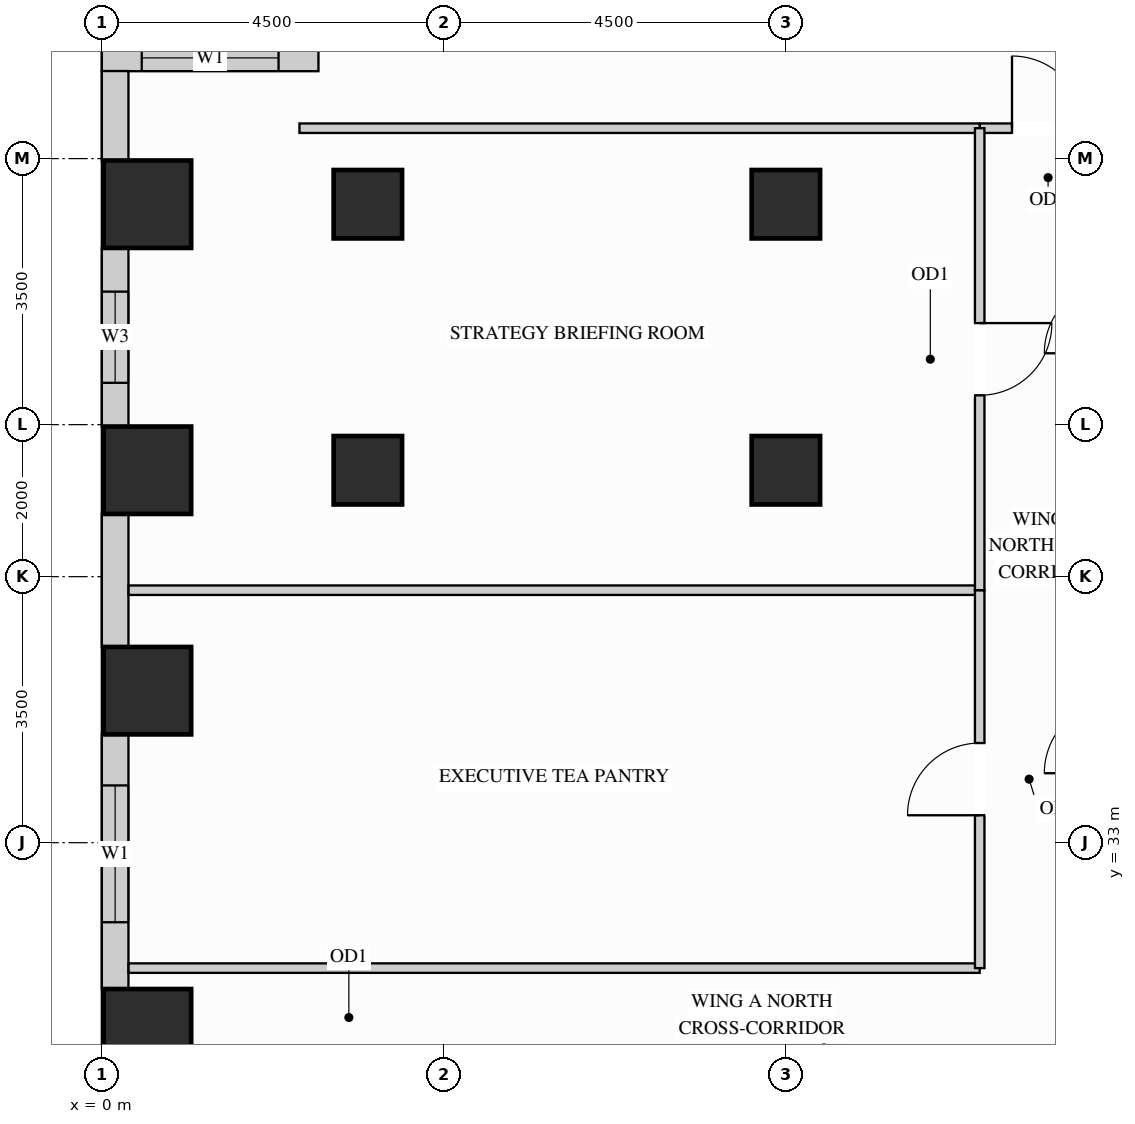
"""IFC4 building model, lengths in metres.
Left out: names, types, materials, properties, quantities, classifications, styles, units other than length and angle.
Written with IfcOpenShell. Run it as: python <this file> out.ifc"""

import sys

from ifc_helpers import new_model, si_unit, direction, frame, frame_2d, origin, origin_2d, place, context, subcontext, project, spatial, rectangle, extrude, source, transform, mapped, element, fill, save


model = new_model("IFC4")
c1 = context("Model", 3, precision=1e-05, world=origin(), true_north=direction((0.0, 1.0)))
c2 = subcontext(c1, "Body", "Model", "MODEL_VIEW")
j1 = project(units=[si_unit("LENGTHUNIT", "METRE"), si_unit("PLANEANGLEUNIT", "RADIAN")], contexts=[c1])
p1 = place(None, origin())
s1 = spatial("IfcSite", under=j1, at=p1, CompositionType="ELEMENT")
p2 = place(p1, origin())
s2 = spatial("IfcBuilding", under=s1, at=p2, CompositionType="ELEMENT")
p3 = place(p2, frame((0.0, 0.0, 113.4)))
s3 = spatial("IfcBuildingStorey", under=s2, at=p3, CompositionType="ELEMENT", Elevation=113.4)
m1 = source(origin(), c2, "Body", "SweptSolid", [
    extrude(rectangle(XDim=0.9, YDim=0.9, at=origin_2d()), origin(), (0.0, 0.0, 1.0), 3.38),
])
for number, where, z_axis, x_axis in (
    (1, (3.5, 37.9, 0.0), (0.0, 0.0, 1.0), (1.0, 0.0, 0.0)),
    (2, (3.5, 41.4, 0.0), (0.0, 0.0, 1.0), (1.0, 0.0, 0.0)),
    (3, (9.0, 37.9, 0.0), (0.0, 0.0, 1.0), (1.0, 0.0, 0.0)),
    (4, (9.0, 41.4, 0.0), (0.0, 0.0, 1.0), (1.0, 0.0, 0.0)),
):
    element("IfcColumn", number, at=place(p3, frame(where, z_axis=z_axis, x_axis=x_axis)), inside=s3, PredefinedType="COLUMN", context=c2, shape_type="MappedRepresentation", body=[
        mapped(m1, transform((0.0, 0.0, 0.0), x_axis=(1.0, 0.0, 0.0), y_axis=(0.0, 1.0, 0.0), z_axis=(0.0, 0.0, 1.0))),
    ])
m2 = source(origin(), c2, "Body", "SweptSolid", [
    extrude(rectangle(XDim=1.15, YDim=1.15, at=origin_2d()), origin(), (0.0, 0.0, 1.0), 3.38),
])
for number, where, z_axis, x_axis in (
    (5, (0.6, 30.5, 0.0), (0.0, 0.0, 1.0), (1.0, 0.0, 0.0)),
    (6, (0.6, 35.0, 0.0), (0.0, 0.0, 1.0), (1.0, 0.0, 0.0)),
    (7, (0.6, 37.9, 0.0), (0.0, 0.0, 1.0), (1.0, 0.0, 0.0)),
    (8, (0.6, 41.4, 0.0), (0.0, 0.0, 1.0), (1.0, 0.0, 0.0)),
):
    element("IfcColumn", number, at=place(p3, frame(where, z_axis=z_axis, x_axis=x_axis)), inside=s3, PredefinedType="COLUMN", context=c2, shape_type="MappedRepresentation", body=[
        mapped(m2, transform((0.0, 0.0, 0.0), x_axis=(1.0, 0.0, 0.0), y_axis=(0.0, 1.0, 0.0), z_axis=(0.0, 0.0, 1.0))),
    ])
p4 = place(p3, frame((2.85, 43.325, 0.0), z_axis=(0.0, 0.0, 1.0), x_axis=(-1.0, 0.0, 0.0)))
e9 = element("IfcWall", 9, at=p4, inside=s3, PredefinedType="SOLIDWALL", context=c2, shape_type="SweptSolid", body=[
    extrude(rectangle(XDim=2.85, YDim=0.35, at=frame_2d((1.425, 0.0))), origin(), (0.0, 0.0, 1.0), 3.365),
])
p5 = place(p4, frame((0.525, 0.0, 0.78)))
e10 = element("IfcOpeningElement", 10, at=p5, cuts=e9, PredefinedType="OPENING", context=c2, shape_type="SweptSolid", body=[
    extrude(rectangle(XDim=1.8, YDim=2.1, at=frame_2d((0.9, 1.05))), frame((0.0, 0.185, 0.0), z_axis=(0.0, -1.0, 0.0), x_axis=(1.0, 0.0, 0.0)), (0.0, 0.0, 1.0), 0.37),
])
m3 = source(origin(), c2, "Body", "SweptSolid", [
    extrude(rectangle(XDim=1.179, YDim=0.35, at=frame_2d((0.59, 0.0))), origin(), (0.0, 0.0, 1.0), 3.365),
])
p6 = place(p3, frame((0.175, 43.152, 0.0), z_axis=(0.0, 0.0, 1.0), x_axis=(0.0, -1.0, 0.0)))
e11 = element("IfcWall", 11, at=p6, inside=s3, PredefinedType="SOLIDWALL", context=c2, shape_type="MappedRepresentation", body=[
    mapped(m3, transform((0.0, 0.0, 0.0), x_axis=(1.0, 0.0, 0.0), y_axis=(0.0, 1.0, 0.0), z_axis=(0.0, 0.0, 1.0))),
])
p7 = place(p3, frame((0.175, 40.827, 0.0), z_axis=(0.0, 0.0, 1.0), x_axis=(0.0, -1.0, 0.0)))
e12 = element("IfcWall", 12, at=p7, inside=s3, PredefinedType="SOLIDWALL", context=c2, shape_type="SweptSolid", body=[
    extrude(rectangle(XDim=2.354, YDim=0.35, at=frame_2d((1.177, 0.0))), origin(), (0.0, 0.0, 1.0), 3.365),
])
p8 = place(p7, frame((0.577, 0.0, 0.78)))
e13 = element("IfcOpeningElement", 13, at=p8, cuts=e12, PredefinedType="OPENING", context=c2, shape_type="SweptSolid", body=[
    extrude(rectangle(XDim=1.2, YDim=2.1, at=frame_2d((0.6, 1.05))), frame((0.0, 0.185, 0.0), z_axis=(0.0, -1.0, 0.0), x_axis=(1.0, 0.0, 0.0)), (0.0, 0.0, 1.0), 0.37),
])
m4 = source(origin(), c2, "Body", "SweptSolid", [
    extrude(rectangle(XDim=1.754, YDim=0.35, at=frame_2d((0.877, 0.0))), origin(), (0.0, 0.0, 1.0), 3.365),
])
p9 = place(p3, frame((0.175, 37.327, 0.0), z_axis=(0.0, 0.0, 1.0), x_axis=(0.0, -1.0, 0.0)))
e14 = element("IfcWall", 14, at=p9, inside=s3, PredefinedType="SOLIDWALL", context=c2, shape_type="MappedRepresentation", body=[
    mapped(m4, transform((0.0, 0.0, 0.0), x_axis=(1.0, 0.0, 0.0), y_axis=(0.0, 1.0, 0.0), z_axis=(0.0, 0.0, 1.0))),
])
p10 = place(p3, frame((0.175, 34.427, 0.0), z_axis=(0.0, 0.0, 1.0), x_axis=(0.0, -1.0, 0.0)))
e15 = element("IfcWall", 15, at=p10, inside=s3, PredefinedType="SOLIDWALL", context=c2, shape_type="SweptSolid", body=[
    extrude(rectangle(XDim=3.354, YDim=0.35, at=frame_2d((1.677, 0.0))), origin(), (0.0, 0.0, 1.0), 3.365),
])
p11 = place(p10, frame((0.674, 0.0, 0.78)))
e16 = element("IfcOpeningElement", 16, at=p11, cuts=e15, PredefinedType="OPENING", context=c2, shape_type="SweptSolid", body=[
    extrude(rectangle(XDim=1.8, YDim=2.1, at=frame_2d((0.9, 1.05))), frame((0.0, 0.185, 0.0), z_axis=(0.0, -1.0, 0.0), x_axis=(1.0, 0.0, 0.0)), (0.0, 0.0, 1.0), 0.37),
])
m5 = source(origin(), c2, "Body", "SweptSolid", [
    extrude(rectangle(XDim=11.198, YDim=0.125, at=frame_2d((5.599, 0.0))), origin(), (0.0, 0.0, 1.0), 3.365),
])
p12 = place(p3, frame((0.352, 31.35, 0.0), z_axis=(0.0, 0.0, 1.0), x_axis=(1.0, 0.0, 0.0)))
e17 = element("IfcWall", 17, at=p12, inside=s3, PredefinedType="PARTITIONING", context=c2, shape_type="MappedRepresentation", body=[
    mapped(m5, transform((0.0, 0.0, 0.0), x_axis=(1.0, 0.0, 0.0), y_axis=(0.0, 1.0, 0.0), z_axis=(0.0, 0.0, 1.0))),
])
m6 = source(origin(), c2, "Body", "SweptSolid", [
    extrude(rectangle(XDim=11.198, YDim=0.125, at=frame_2d((5.599, 0.0))), origin(), (0.0, 0.0, 1.0), 2.828),
])
p13 = place(p3, frame((0.352, 36.322, 0.0), z_axis=(0.0, 0.0, 1.0), x_axis=(1.0, 0.0, 0.0)))
e18 = element("IfcWall", 18, at=p13, inside=s3, PredefinedType="PARTITIONING", context=c2, shape_type="MappedRepresentation", body=[
    mapped(m6, transform((0.0, 0.0, 0.0), x_axis=(1.0, 0.0, 0.0), y_axis=(0.0, 1.0, 0.0), z_axis=(0.0, 0.0, 1.0))),
])
p14 = place(p3, frame((11.55, 42.4, 0.0), z_axis=(0.0, 0.0, 1.0), x_axis=(1.0, 0.0, 0.0)))
e19 = element("IfcWall", 19, at=p14, inside=s3, PredefinedType="PARTITIONING", context=c2, shape_type="SweptSolid", body=[
    extrude(rectangle(XDim=1.8, YDim=0.125, at=frame_2d((0.9, 0.0))), origin(), (0.0, 0.0, 1.0), 3.365),
])
p15 = place(p14, frame((0.425, 0.0, 0.0)))
e20 = element("IfcOpeningElement", 20, at=p15, cuts=e19, PredefinedType="OPENING", context=c2, shape_type="SweptSolid", body=[
    extrude(rectangle(XDim=0.95, YDim=2.15, at=frame_2d((0.475, 1.075))), frame((0.0, 0.073, 0.0), z_axis=(0.0, -1.0, 0.0), x_axis=(1.0, 0.0, 0.0)), (0.0, 0.0, 1.0), 0.145),
])
m7 = source(origin(), c2, "Body", "SweptSolid", [
    extrude(rectangle(XDim=8.95, YDim=0.125, at=frame_2d((4.475, 0.0))), origin(), (0.0, 0.0, 1.0), 3.365),
])
p16 = place(p3, frame((2.6, 42.4, 0.0), z_axis=(0.0, 0.0, 1.0), x_axis=(1.0, 0.0, 0.0)))
e21 = element("IfcWall", 21, at=p16, inside=s3, PredefinedType="PARTITIONING", context=c2, shape_type="MappedRepresentation", body=[
    mapped(m7, transform((0.0, 0.0, 0.0), x_axis=(1.0, 0.0, 0.0), y_axis=(0.0, 1.0, 0.0), z_axis=(0.0, 0.0, 1.0))),
])
p17 = place(p3, frame((11.55, 31.35, 0.0), z_axis=(0.0, 0.0, 1.0), x_axis=(0.0, 1.0, 0.0)))
e22 = element("IfcWall", 22, at=p17, inside=s3, PredefinedType="PARTITIONING", context=c2, shape_type="SweptSolid", body=[
    extrude(rectangle(XDim=4.972, YDim=0.125, at=frame_2d((2.486, 0.0))), origin(), (0.0, 0.0, 1.0), 3.365),
])
p18 = place(p17, frame((2.011, 0.0, 0.0)))
e23 = element("IfcOpeningElement", 23, at=p18, cuts=e22, PredefinedType="OPENING", context=c2, shape_type="SweptSolid", body=[
    extrude(rectangle(XDim=0.95, YDim=2.15, at=frame_2d((0.475, 1.075))), frame((0.0, 0.073, 0.0), z_axis=(0.0, -1.0, 0.0), x_axis=(1.0, 0.0, 0.0)), (0.0, 0.0, 1.0), 0.145),
])
p19 = place(p3, frame((11.55, 36.322, 0.0), z_axis=(0.0, 0.0, 1.0), x_axis=(0.0, 1.0, 0.0)))
e24 = element("IfcWall", 24, at=p19, inside=s3, PredefinedType="PARTITIONING", context=c2, shape_type="SweptSolid", body=[
    extrude(rectangle(XDim=6.078, YDim=0.125, at=frame_2d((3.039, 0.0))), origin(), (0.0, 0.0, 1.0), 3.365),
])
p20 = place(p19, frame((2.564, 0.0, 0.0)))
e25 = element("IfcOpeningElement", 25, at=p20, cuts=e24, PredefinedType="OPENING", context=c2, shape_type="SweptSolid", body=[
    extrude(rectangle(XDim=0.95, YDim=2.15, at=frame_2d((0.475, 1.075))), frame((0.0, 0.073, 0.0), z_axis=(0.0, -1.0, 0.0), x_axis=(1.0, 0.0, 0.0)), (0.0, 0.0, 1.0), 0.145),
])
m8 = source(origin(), c2, "Body", "SweptSolid", [
    extrude(rectangle(XDim=0.95, YDim=2.15, at=frame_2d((0.475, 1.075))), frame((0.0, 0.025, 0.0), z_axis=(0.0, -1.0, 0.0), x_axis=(1.0, 0.0, 0.0)), (0.0, 0.0, 1.0), 0.05),
])
p21 = place(p15, origin())
e26 = element("IfcDoor", 26, at=p21, inside=s3, OperationType="SINGLE_SWING_LEFT", PredefinedType="DOOR", context=c2, shape_type="MappedRepresentation", body=[
    mapped(m8, transform((0.0, 0.0, 0.0), x_axis=(1.0, 0.0, 0.0), y_axis=(0.0, 1.0, 0.0), z_axis=(0.0, 0.0, 1.0))),
])
fill(e20, e26)
p22 = place(p18, origin())
e27 = element("IfcDoor", 27, at=p22, inside=s3, OperationType="SINGLE_SWING_LEFT", PredefinedType="DOOR", context=c2, shape_type="MappedRepresentation", body=[
    mapped(m8, transform((0.0, 0.0, 0.0), x_axis=(1.0, 0.0, 0.0), y_axis=(0.0, 1.0, 0.0), z_axis=(0.0, 0.0, 1.0))),
])
fill(e23, e27)
p23 = place(p20, origin())
e28 = element("IfcDoor", 28, at=p23, inside=s3, OperationType="SINGLE_SWING_RIGHT", PredefinedType="DOOR", context=c2, shape_type="MappedRepresentation", body=[
    mapped(m8, transform((0.0, 0.0, 0.0), x_axis=(1.0, 0.0, 0.0), y_axis=(0.0, 1.0, 0.0), z_axis=(0.0, 0.0, 1.0))),
])
fill(e25, e28)
m9 = source(origin(), c2, "Body", "SweptSolid", [
    extrude(rectangle(XDim=1.8, YDim=2.1, at=frame_2d((0.9, 1.05))), frame((0.0, 0.03, 0.0), z_axis=(0.0, -1.0, 0.0), x_axis=(1.0, 0.0, 0.0)), (0.0, 0.0, 1.0), 0.06),
])
p24 = place(p5, origin())
e29 = element("IfcWindow", 29, at=p24, inside=s3, PartitioningType="SINGLE_PANEL", PredefinedType="WINDOW", context=c2, shape_type="MappedRepresentation", body=[
    mapped(m9, transform((0.0, 0.0, 0.0), x_axis=(1.0, 0.0, 0.0), y_axis=(0.0, 1.0, 0.0), z_axis=(0.0, 0.0, 1.0))),
])
fill(e10, e29)
p25 = place(p11, origin())
e30 = element("IfcWindow", 30, at=p25, inside=s3, PartitioningType="SINGLE_PANEL", PredefinedType="WINDOW", context=c2, shape_type="MappedRepresentation", body=[
    mapped(m9, transform((0.0, 0.0, 0.0), x_axis=(1.0, 0.0, 0.0), y_axis=(0.0, 1.0, 0.0), z_axis=(0.0, 0.0, 1.0))),
])
fill(e16, e30)
m10 = source(origin(), c2, "Body", "SweptSolid", [
    extrude(rectangle(XDim=1.2, YDim=2.1, at=frame_2d((0.6, 1.05))), frame((0.0, 0.03, 0.0), z_axis=(0.0, -1.0, 0.0), x_axis=(1.0, 0.0, 0.0)), (0.0, 0.0, 1.0), 0.06),
])
p26 = place(p8, origin())
e31 = element("IfcWindow", 31, at=p26, inside=s3, PartitioningType="SINGLE_PANEL", PredefinedType="WINDOW", context=c2, shape_type="MappedRepresentation", body=[
    mapped(m10, transform((0.0, 0.0, 0.0), x_axis=(1.0, 0.0, 0.0), y_axis=(0.0, 1.0, 0.0), z_axis=(0.0, 0.0, 1.0))),
])
fill(e13, e31)
save(model, sys.argv[1])
